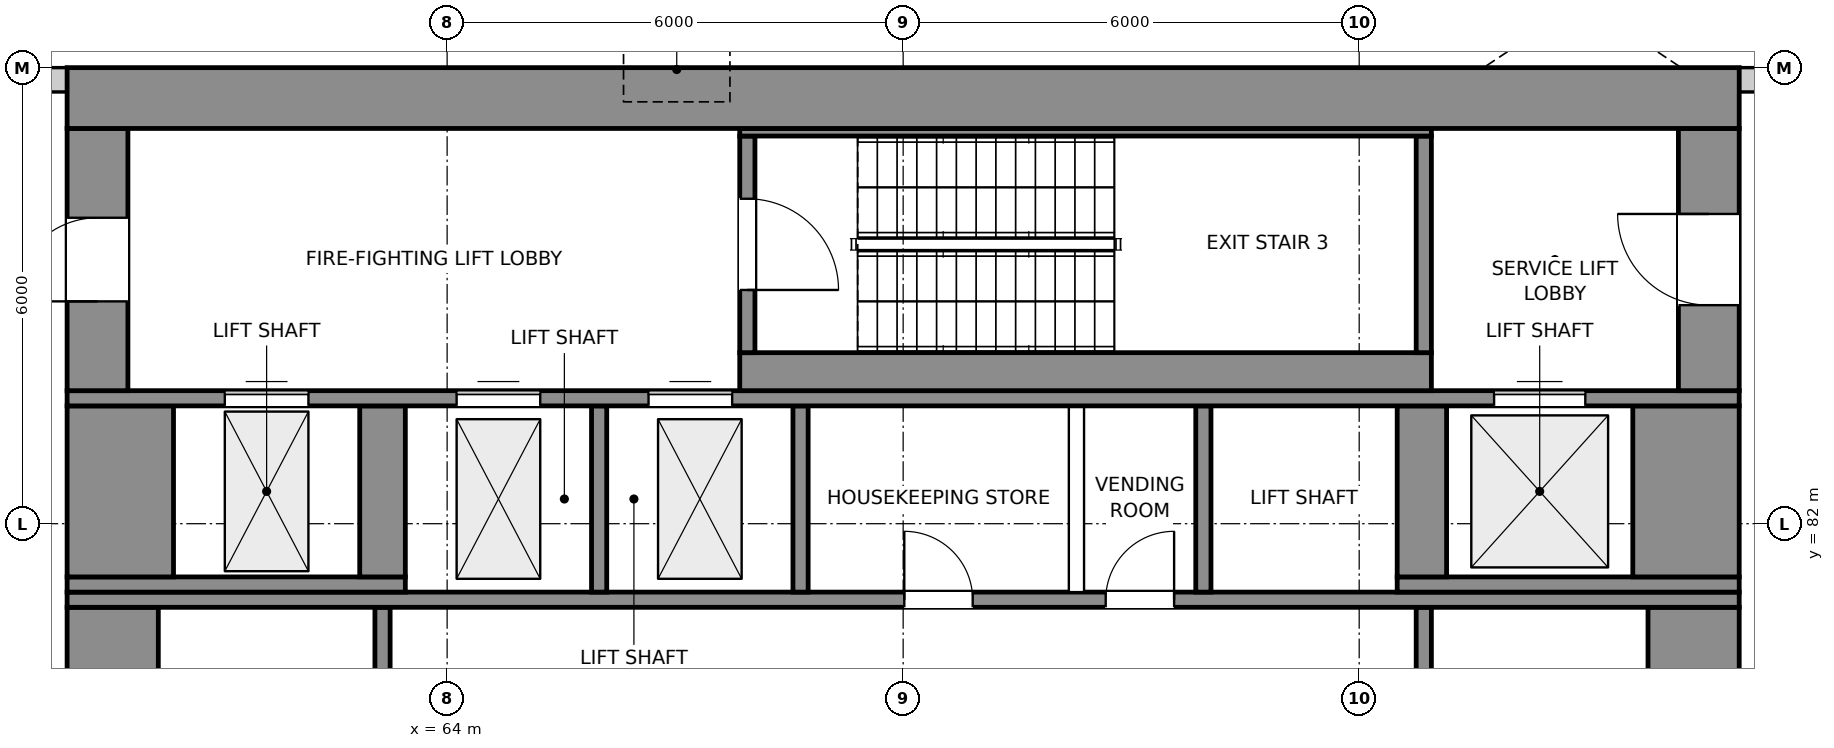
"""IFC4 building model, lengths in metres.
Left out: names, types, materials, properties, quantities, classifications, styles, units other than length and angle.
Written with IfcOpenShell. Run it as: python <this file> out.ifc"""

import sys

from ifc_helpers import new_model, si_unit, direction, frame, frame_2d, origin, place, context, subcontext, project, spatial, rectangle, extrude, element, fill, save


model = new_model("IFC4")
c1 = context("Model", 3, precision=1e-05, world=origin(), true_north=direction((0.0, 1.0)))
c2 = subcontext(c1, "Body", "Model", "MODEL_VIEW")
j1 = project(units=[si_unit("LENGTHUNIT", "METRE"), si_unit("PLANEANGLEUNIT", "RADIAN")], contexts=[c1])
p1 = place(None, origin())
s1 = spatial("IfcSite", under=j1, at=p1, CompositionType="ELEMENT")
p2 = place(p1, origin())
s2 = spatial("IfcBuilding", under=s1, at=p2, CompositionType="ELEMENT")
p3 = place(p2, frame((0.0, 0.0, 243.3)))
s3 = spatial("IfcBuildingStorey", under=s2, at=p3, CompositionType="ELEMENT", Elevation=243.3)
for number, where, z_axis, x_axis in (
    (1, (81.385, 87.84, 0.0), (0.0, 0.0, 1.0), (-1.0, 0.0, 0.0)),
    (2, (59.0, 87.84, 0.0), (0.0, 0.0, 1.0), (-1.0, 0.0, 0.0)),
):
    element("IfcWall", number, at=place(p3, frame(where, z_axis=z_axis, x_axis=x_axis)), inside=s3, PredefinedType="SOLIDWALL", context=c2, shape_type="SweptSolid", body=[
        extrude(rectangle(XDim=0.385, YDim=0.32, at=frame_2d((0.192, 0.0))), origin(), (0.0, 0.0, 1.0), 4.7),
    ])
for number, where, z_axis, x_axis in (
    (3, (59.6, 71.8, 0.0), (0.0, 0.0, 1.0), (0.0, 1.0, 0.0)),
    (4, (80.4, 71.8, 0.0), (0.0, 0.0, 1.0), (0.0, 1.0, 0.0)),
):
    element("IfcWall", number, at=place(p3, frame(where, z_axis=z_axis, x_axis=x_axis)), inside=s3, PredefinedType="SHEAR", context=c2, shape_type="SweptSolid", body=[
        extrude(rectangle(XDim=9.1, YDim=1.2, at=frame_2d((4.55, 0.0))), origin(), (0.0, 0.0, 1.0), 5.0),
    ])
for number, where, z_axis, x_axis in (
    (5, (63.15, 77.7, 0.0), (0.0, 0.0, 1.0), (0.0, 1.0, 0.0)),
    (6, (76.85, 77.7, 0.0), (0.0, 0.0, 1.0), (0.0, 1.0, 0.0)),
):
    element("IfcWall", number, at=place(p3, frame(where, z_axis=z_axis, x_axis=x_axis)), inside=s3, PredefinedType="SHEAR", context=c2, shape_type="SweptSolid", body=[
        extrude(rectangle(XDim=3.2, YDim=0.2, at=frame_2d((1.6, 0.0))), origin(), (0.0, 0.0, 1.0), 5.0),
    ])
p4 = place(p3, frame((59.0, 81.0, 0.0), z_axis=(0.0, 0.0, 1.0), x_axis=(1.0, 0.0, 0.0)))
e7 = element("IfcWall", 7, at=p4, inside=s3, PredefinedType="SHEAR", context=c2, shape_type="SweptSolid", body=[
    extrude(rectangle(XDim=22.0, YDim=0.2, at=frame_2d((11.0, 0.0))), origin(), (0.0, 0.0, 1.0), 5.0),
])
p5 = place(p4, frame((11.015, 0.0, 0.0)))
e8 = element("IfcOpeningElement", 8, at=p5, cuts=e7, PredefinedType="OPENING", context=c2, shape_type="SweptSolid", body=[
    extrude(rectangle(XDim=0.9, YDim=2.1, at=frame_2d((0.45, 1.05))), frame((0.0, 0.11, 0.0), z_axis=(0.0, -1.0, 0.0), x_axis=(1.0, 0.0, 0.0)), (0.0, 0.0, 1.0), 0.22),
])
p6 = place(p4, frame((13.665, 0.0, 0.0)))
e9 = element("IfcOpeningElement", 9, at=p6, cuts=e7, PredefinedType="OPENING", context=c2, shape_type="SweptSolid", body=[
    extrude(rectangle(XDim=0.9, YDim=2.1, at=frame_2d((0.45, 1.05))), frame((0.0, 0.11, 0.0), z_axis=(0.0, -1.0, 0.0), x_axis=(1.0, 0.0, 0.0)), (0.0, 0.0, 1.0), 0.22),
])
p7 = place(p3, frame((59.0, 81.2, 0.0), z_axis=(0.0, 0.0, 1.0), x_axis=(1.0, 0.0, 0.0)))
e10 = element("IfcWall", 10, at=p7, inside=s3, PredefinedType="SHEAR", context=c2, shape_type="SweptSolid", body=[
    extrude(rectangle(XDim=4.45, YDim=0.2, at=frame_2d((2.225, 0.0))), origin(), (0.0, 0.0, 1.0), 5.0),
])
for number, where, z_axis, x_axis in (
    (11, (66.0, 81.1, 0.0), (0.0, 0.0, 1.0), (0.0, 1.0, 0.0)),
    (12, (68.65, 81.1, 0.0), (0.0, 0.0, 1.0), (0.0, 1.0, 0.0)),
):
    element("IfcWall", number, at=place(p3, frame(where, z_axis=z_axis, x_axis=x_axis)), inside=s3, PredefinedType="SHEAR", context=c2, shape_type="SweptSolid", body=[
        extrude(rectangle(XDim=2.45, YDim=0.2, at=frame_2d((1.225, 0.0))), origin(), (0.0, 0.0, 1.0), 5.0),
    ])
p8 = place(p3, frame((72.28, 81.1, 0.0), z_axis=(0.0, 0.0, 1.0), x_axis=(0.0, 1.0, 0.0)))
e13 = element("IfcWall", 13, at=p8, inside=s3, PredefinedType="PARTITIONING", context=c2, shape_type="SweptSolid", body=[
    extrude(rectangle(XDim=2.45, YDim=0.2, at=frame_2d((1.225, 0.0))), origin(), (0.0, 0.0, 1.0), 4.7),
])
p9 = place(p3, frame((73.95, 81.1, 0.0), z_axis=(0.0, 0.0, 1.0), x_axis=(0.0, 1.0, 0.0)))
e14 = element("IfcWall", 14, at=p9, inside=s3, PredefinedType="SHEAR", context=c2, shape_type="SweptSolid", body=[
    extrude(rectangle(XDim=2.45, YDim=0.2, at=frame_2d((1.225, 0.0))), origin(), (0.0, 0.0, 1.0), 5.0),
])
p10 = place(p3, frame((76.5, 81.2, 0.0), z_axis=(0.0, 0.0, 1.0), x_axis=(1.0, 0.0, 0.0)))
e15 = element("IfcWall", 15, at=p10, inside=s3, PredefinedType="SHEAR", context=c2, shape_type="SweptSolid", body=[
    extrude(rectangle(XDim=4.5, YDim=0.2, at=frame_2d((2.25, 0.0))), origin(), (0.0, 0.0, 1.0), 5.0),
])
p11 = place(p3, frame((59.7, 81.3, 0.0), z_axis=(0.0, 0.0, 1.0), x_axis=(0.0, 1.0, 0.0)))
e16 = element("IfcWall", 16, at=p11, inside=s3, PredefinedType="SHEAR", context=c2, shape_type="SweptSolid", body=[
    extrude(rectangle(XDim=2.25, YDim=1.4, at=frame_2d((1.125, 0.0))), origin(), (0.0, 0.0, 1.0), 5.0),
])
p12 = place(p3, frame((63.15, 81.3, 0.0), z_axis=(0.0, 0.0, 1.0), x_axis=(0.0, 1.0, 0.0)))
e17 = element("IfcWall", 17, at=p12, inside=s3, PredefinedType="SHEAR", context=c2, shape_type="SweptSolid", body=[
    extrude(rectangle(XDim=2.25, YDim=0.6, at=frame_2d((1.125, 0.0))), origin(), (0.0, 0.0, 1.0), 5.0),
])
p13 = place(p3, frame((76.825, 81.3, 0.0), z_axis=(0.0, 0.0, 1.0), x_axis=(0.0, 1.0, 0.0)))
e18 = element("IfcWall", 18, at=p13, inside=s3, PredefinedType="SHEAR", context=c2, shape_type="SweptSolid", body=[
    extrude(rectangle(XDim=2.25, YDim=0.65, at=frame_2d((1.125, 0.0))), origin(), (0.0, 0.0, 1.0), 5.0),
])
p14 = place(p3, frame((80.3, 81.3, 0.0), z_axis=(0.0, 0.0, 1.0), x_axis=(0.0, 1.0, 0.0)))
e19 = element("IfcWall", 19, at=p14, inside=s3, PredefinedType="SHEAR", context=c2, shape_type="SweptSolid", body=[
    extrude(rectangle(XDim=2.25, YDim=1.4, at=frame_2d((1.125, 0.0))), origin(), (0.0, 0.0, 1.0), 5.0),
])
p15 = place(p3, frame((59.0, 83.65, 0.0), z_axis=(0.0, 0.0, 1.0), x_axis=(1.0, 0.0, 0.0)))
e20 = element("IfcWall", 20, at=p15, inside=s3, PredefinedType="SHEAR", context=c2, shape_type="SweptSolid", body=[
    extrude(rectangle(XDim=22.0, YDim=0.2, at=frame_2d((11.0, 0.0))), origin(), (0.0, 0.0, 1.0), 5.0),
])
p16 = place(p15, frame((5.125, 0.0, 0.0)))
e21 = element("IfcOpeningElement", 21, at=p16, cuts=e20, PredefinedType="OPENING", context=c2, shape_type="SweptSolid", body=[
    extrude(rectangle(XDim=1.1, YDim=2.1, at=frame_2d((0.55, 1.05))), frame((0.0, 0.11, 0.0), z_axis=(0.0, -1.0, 0.0), x_axis=(1.0, 0.0, 0.0)), (0.0, 0.0, 1.0), 0.22),
])
p17 = place(p15, frame((7.65, 0.0, 0.0)))
e22 = element("IfcOpeningElement", 22, at=p17, cuts=e20, PredefinedType="OPENING", context=c2, shape_type="SweptSolid", body=[
    extrude(rectangle(XDim=1.1, YDim=2.1, at=frame_2d((0.55, 1.05))), frame((0.0, 0.11, 0.0), z_axis=(0.0, -1.0, 0.0), x_axis=(1.0, 0.0, 0.0)), (0.0, 0.0, 1.0), 0.22),
])
p18 = place(p15, frame((18.775, 0.0, 0.0)))
e23 = element("IfcOpeningElement", 23, at=p18, cuts=e20, PredefinedType="OPENING", context=c2, shape_type="SweptSolid", body=[
    extrude(rectangle(XDim=1.2, YDim=2.1, at=frame_2d((0.6, 1.05))), frame((0.0, 0.11, 0.0), z_axis=(0.0, -1.0, 0.0), x_axis=(1.0, 0.0, 0.0)), (0.0, 0.0, 1.0), 0.22),
])
p19 = place(p15, frame((2.075, 0.0, 0.0)))
e24 = element("IfcOpeningElement", 24, at=p19, cuts=e20, PredefinedType="OPENING", context=c2, shape_type="SweptSolid", body=[
    extrude(rectangle(XDim=1.1, YDim=2.1, at=frame_2d((0.55, 1.05))), frame((0.0, 0.11, 0.0), z_axis=(0.0, -1.0, 0.0), x_axis=(1.0, 0.0, 0.0)), (0.0, 0.0, 1.0), 0.22),
])
p20 = place(p3, frame((59.4, 83.75, 0.0), z_axis=(0.0, 0.0, 1.0), x_axis=(0.0, 1.0, 0.0)))
e25 = element("IfcWall", 25, at=p20, inside=s3, PredefinedType="SHEAR", context=c2, shape_type="SweptSolid", body=[
    extrude(rectangle(XDim=3.45, YDim=0.8, at=frame_2d((1.725, 0.0))), origin(), (0.0, 0.0, 1.0), 5.0),
])
p21 = place(p20, frame((1.175, 0.0, 0.0)))
e26 = element("IfcOpeningElement", 26, at=p21, cuts=e25, PredefinedType="OPENING", context=c2, shape_type="SweptSolid", body=[
    extrude(rectangle(XDim=1.1, YDim=2.1, at=frame_2d((0.55, 1.05))), frame((0.0, 0.41, 0.0), z_axis=(0.0, -1.0, 0.0), x_axis=(1.0, 0.0, 0.0)), (0.0, 0.0, 1.0), 0.82),
])
p22 = place(p3, frame((67.85, 84.0, 0.0), z_axis=(0.0, 0.0, 1.0), x_axis=(1.0, 0.0, 0.0)))
e27 = element("IfcWall", 27, at=p22, inside=s3, PredefinedType="SHEAR", context=c2, shape_type="SweptSolid", body=[
    extrude(rectangle(XDim=9.1, YDim=0.5, at=frame_2d((4.55, 0.0))), origin(), (0.0, 0.0, 1.0), 5.0),
])
p23 = place(p3, frame((80.6, 83.75, 0.0), z_axis=(0.0, 0.0, 1.0), x_axis=(0.0, 1.0, 0.0)))
e28 = element("IfcWall", 28, at=p23, inside=s3, PredefinedType="SHEAR", context=c2, shape_type="SweptSolid", body=[
    extrude(rectangle(XDim=3.45, YDim=0.8, at=frame_2d((1.725, 0.0))), origin(), (0.0, 0.0, 1.0), 5.0),
])
p24 = place(p23, frame((1.125, 0.0, 0.0)))
e29 = element("IfcOpeningElement", 29, at=p24, cuts=e28, PredefinedType="OPENING", context=c2, shape_type="SweptSolid", body=[
    extrude(rectangle(XDim=1.2, YDim=2.1, at=frame_2d((0.6, 1.05))), frame((0.0, 0.41, 0.0), z_axis=(0.0, -1.0, 0.0), x_axis=(1.0, 0.0, 0.0)), (0.0, 0.0, 1.0), 0.82),
])
p25 = place(p3, frame((67.95, 84.25, 0.0), z_axis=(0.0, 0.0, 1.0), x_axis=(0.0, 1.0, 0.0)))
e30 = element("IfcWall", 30, at=p25, inside=s3, PredefinedType="SHEAR", context=c2, shape_type="SweptSolid", body=[
    extrude(rectangle(XDim=2.85, YDim=0.2, at=frame_2d((1.425, 0.0))), origin(), (0.0, 0.0, 1.0), 5.0),
])
p26 = place(p25, frame((0.825, 0.0, 0.0)))
e31 = element("IfcOpeningElement", 31, at=p26, cuts=e30, PredefinedType="OPENING", context=c2, shape_type="SweptSolid", body=[
    extrude(rectangle(XDim=1.2, YDim=2.1, at=frame_2d((0.6, 1.05))), frame((0.0, 0.11, 0.0), z_axis=(0.0, -1.0, 0.0), x_axis=(1.0, 0.0, 0.0)), (0.0, 0.0, 1.0), 0.22),
])
p27 = place(p3, frame((76.85, 84.25, 0.0), z_axis=(0.0, 0.0, 1.0), x_axis=(0.0, 1.0, 0.0)))
e32 = element("IfcWall", 32, at=p27, inside=s3, PredefinedType="SHEAR", context=c2, shape_type="SweptSolid", body=[
    extrude(rectangle(XDim=2.85, YDim=0.2, at=frame_2d((1.425, 0.0))), origin(), (0.0, 0.0, 1.0), 5.0),
])
p28 = place(p3, frame((67.85, 87.15, 0.0), z_axis=(0.0, 0.0, 1.0), x_axis=(1.0, 0.0, 0.0)))
e33 = element("IfcWall", 33, at=p28, inside=s3, PredefinedType="SHEAR", context=c2, shape_type="SweptSolid", body=[
    extrude(rectangle(XDim=9.1, YDim=0.1, at=frame_2d((4.55, 0.0))), origin(), (0.0, 0.0, 1.0), 5.0),
])
p29 = place(p3, frame((59.0, 87.6, 0.0), z_axis=(0.0, 0.0, 1.0), x_axis=(1.0, 0.0, 0.0)))
e34 = element("IfcWall", 34, at=p29, inside=s3, PredefinedType="SHEAR", context=c2, shape_type="SweptSolid", body=[
    extrude(rectangle(XDim=22.0, YDim=0.8, at=frame_2d((11.0, 0.0))), origin(), (0.0, 0.0, 1.0), 5.0),
])
p30 = place(p26, frame((1.2, 0.0, 0.0), z_axis=(0.0, 0.0, 1.0), x_axis=(-1.0, 0.0, 0.0)))
e35 = element("IfcDoor", 35, at=p30, inside=s3, OperationType="SINGLE_SWING_RIGHT", PredefinedType="DOOR", context=c2, shape_type="SweptSolid", body=[
    extrude(rectangle(XDim=1.2, YDim=2.1, at=frame_2d((0.6, 1.05))), frame((0.0, 0.025, 0.0), z_axis=(0.0, -1.0, 0.0), x_axis=(1.0, 0.0, 0.0)), (0.0, 0.0, 1.0), 0.05),
])
fill(e31, e35)
p31 = place(p21, origin())
e36 = element("IfcDoor", 36, at=p31, inside=s3, OperationType="SINGLE_SWING_LEFT", PredefinedType="DOOR", context=c2, shape_type="SweptSolid", body=[
    extrude(rectangle(XDim=1.1, YDim=2.1, at=frame_2d((0.55, 1.05))), frame((0.0, 0.025, 0.0), z_axis=(0.0, -1.0, 0.0), x_axis=(1.0, 0.0, 0.0)), (0.0, 0.0, 1.0), 0.05),
])
fill(e26, e36)
p32 = place(p24, origin())
e37 = element("IfcDoor", 37, at=p32, inside=s3, OperationType="SINGLE_SWING_RIGHT", PredefinedType="DOOR", context=c2, shape_type="SweptSolid", body=[
    extrude(rectangle(XDim=1.2, YDim=2.1, at=frame_2d((0.6, 1.05))), frame((0.0, 0.025, 0.0), z_axis=(0.0, -1.0, 0.0), x_axis=(1.0, 0.0, 0.0)), (0.0, 0.0, 1.0), 0.05),
])
fill(e29, e37)
p33 = place(p16, origin())
e38 = element("IfcDoor", 38, at=p33, inside=s3, OperationType="DOUBLE_DOOR_SLIDING", PredefinedType="DOOR", context=c2, shape_type="SweptSolid", body=[
    extrude(rectangle(XDim=1.1, YDim=2.1, at=frame_2d((0.55, 1.05))), frame((0.0, 0.025, 0.0), z_axis=(0.0, -1.0, 0.0), x_axis=(1.0, 0.0, 0.0)), (0.0, 0.0, 1.0), 0.05),
])
fill(e21, e38)
p34 = place(p17, origin())
e39 = element("IfcDoor", 39, at=p34, inside=s3, OperationType="DOUBLE_DOOR_SLIDING", PredefinedType="DOOR", context=c2, shape_type="SweptSolid", body=[
    extrude(rectangle(XDim=1.1, YDim=2.1, at=frame_2d((0.55, 1.05))), frame((0.0, 0.025, 0.0), z_axis=(0.0, -1.0, 0.0), x_axis=(1.0, 0.0, 0.0)), (0.0, 0.0, 1.0), 0.05),
])
fill(e22, e39)
p35 = place(p18, origin())
e40 = element("IfcDoor", 40, at=p35, inside=s3, OperationType="DOUBLE_DOOR_SLIDING", PredefinedType="DOOR", context=c2, shape_type="SweptSolid", body=[
    extrude(rectangle(XDim=1.2, YDim=2.1, at=frame_2d((0.6, 1.05))), frame((0.0, 0.025, 0.0), z_axis=(0.0, -1.0, 0.0), x_axis=(1.0, 0.0, 0.0)), (0.0, 0.0, 1.0), 0.05),
])
fill(e23, e40)
p36 = place(p19, origin())
e41 = element("IfcDoor", 41, at=p36, inside=s3, OperationType="DOUBLE_DOOR_SLIDING", PredefinedType="DOOR", context=c2, shape_type="SweptSolid", body=[
    extrude(rectangle(XDim=1.1, YDim=2.1, at=frame_2d((0.55, 1.05))), frame((0.0, 0.025, 0.0), z_axis=(0.0, -1.0, 0.0), x_axis=(1.0, 0.0, 0.0)), (0.0, 0.0, 1.0), 0.05),
])
fill(e24, e41)
p37 = place(p5, origin())
e42 = element("IfcDoor", 42, at=p37, inside=s3, OperationType="SINGLE_SWING_LEFT", PredefinedType="DOOR", context=c2, shape_type="SweptSolid", body=[
    extrude(rectangle(XDim=0.9, YDim=2.1, at=frame_2d((0.45, 1.05))), frame((0.0, 0.025, 0.0), z_axis=(0.0, -1.0, 0.0), x_axis=(1.0, 0.0, 0.0)), (0.0, 0.0, 1.0), 0.05),
])
fill(e8, e42)
p38 = place(p6, origin())
e43 = element("IfcDoor", 43, at=p38, inside=s3, OperationType="SINGLE_SWING_RIGHT", PredefinedType="DOOR", context=c2, shape_type="SweptSolid", body=[
    extrude(rectangle(XDim=0.9, YDim=2.1, at=frame_2d((0.45, 1.05))), frame((0.0, 0.025, 0.0), z_axis=(0.0, -1.0, 0.0), x_axis=(1.0, 0.0, 0.0)), (0.0, 0.0, 1.0), 0.05),
])
fill(e9, e43)
save(model, sys.argv[1])
